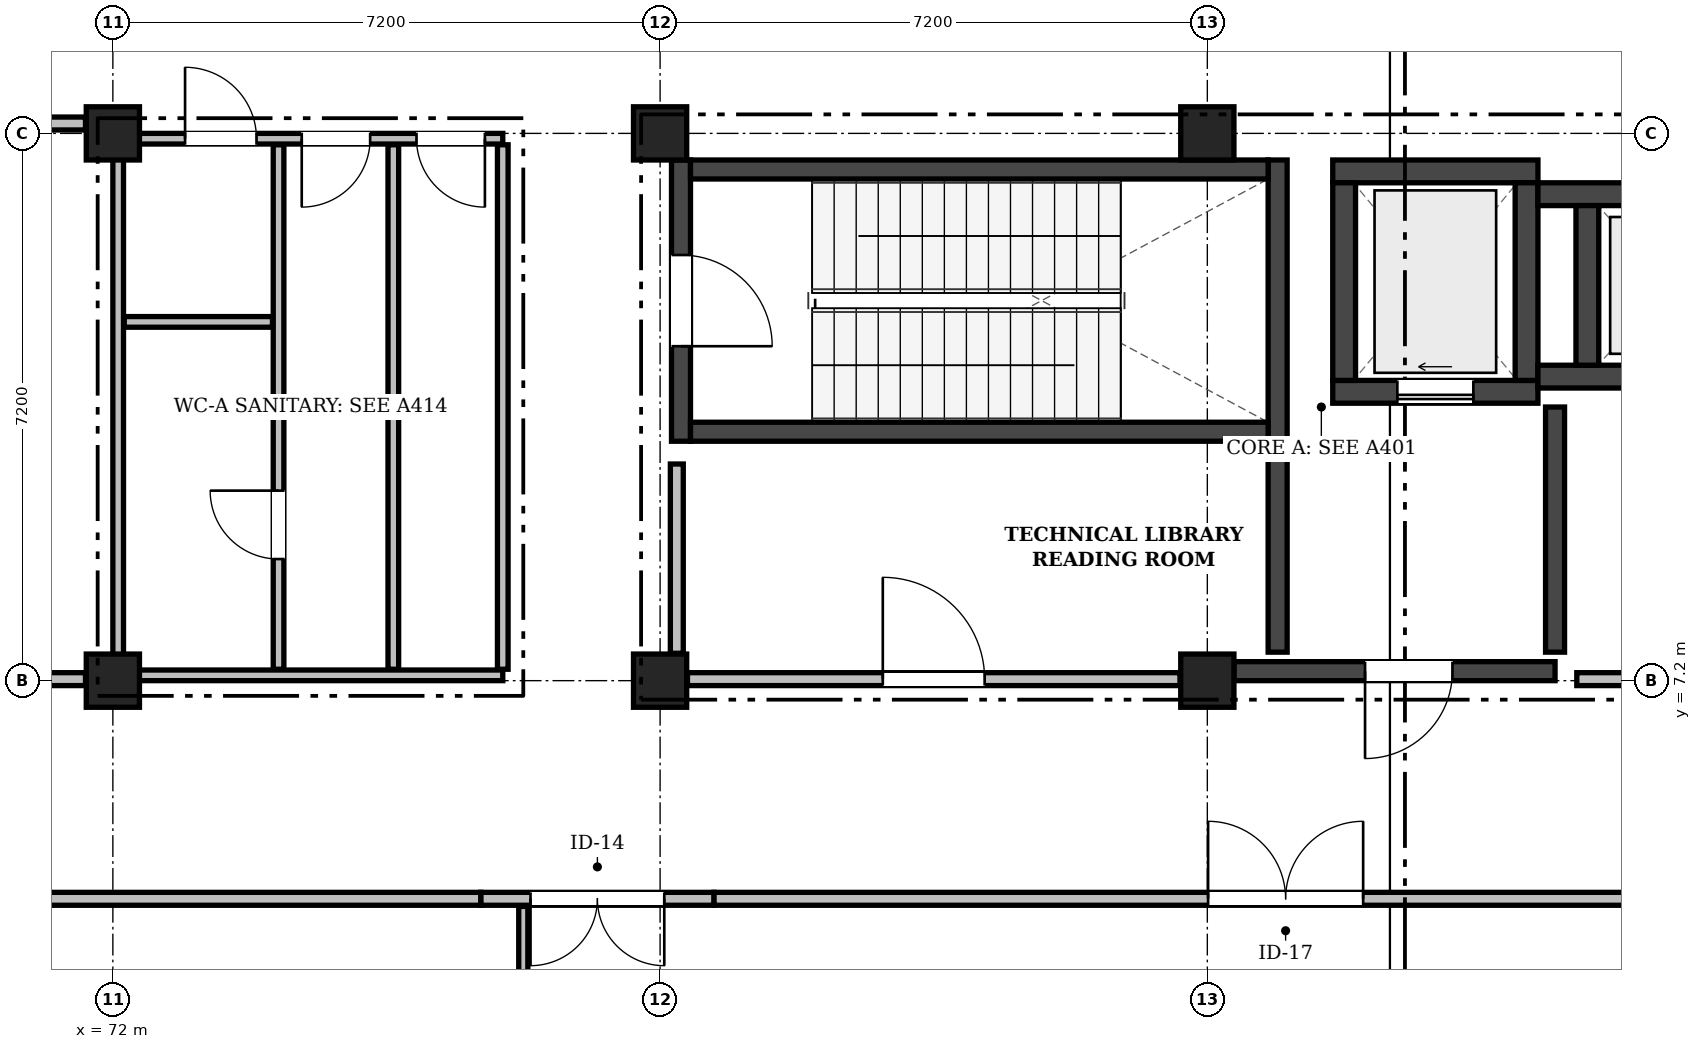
"""IFC4 building model, lengths in metres.
Left out: names, types, materials, properties, quantities, classifications, styles, units other than length and angle.
Written with IfcOpenShell. Run it as: python <this file> out.ifc"""

import sys

from ifc_helpers import new_model, si_unit, direction, frame, frame_2d, origin, origin_2d, place, context, subcontext, project, spatial, rectangle, extrude, element, fill, save


model = new_model("IFC4")
c1 = context("Model", 3, precision=1e-05, world=origin(), true_north=direction((0.0, 1.0)))
c2 = subcontext(c1, "Body", "Model", "MODEL_VIEW")
j1 = project(units=[si_unit("LENGTHUNIT", "METRE"), si_unit("PLANEANGLEUNIT", "RADIAN")], contexts=[c1])
p1 = place(None, origin())
s1 = spatial("IfcSite", under=j1, at=p1, CompositionType="ELEMENT")
p2 = place(p1, origin())
s2 = spatial("IfcBuilding", under=s1, at=p2, CompositionType="ELEMENT")
p3 = place(p2, frame((0.0, 0.0, 18.9)))
s3 = spatial("IfcBuildingStorey", under=s2, at=p3, CompositionType="ELEMENT", Elevation=18.9)
for number, where, z_axis, x_axis in (
    (1, (72.0, 7.2, 0.0), (0.0, 0.0, 1.0), (1.0, 0.0, 0.0)),
    (2, (72.0, 14.4, 0.0), (0.0, 0.0, 1.0), (1.0, 0.0, 0.0)),
    (3, (79.2, 7.2, 0.0), (0.0, 0.0, 1.0), (1.0, 0.0, 0.0)),
    (4, (79.2, 14.4, 0.0), (0.0, 0.0, 1.0), (1.0, 0.0, 0.0)),
    (5, (86.4, 7.2, 0.0), (0.0, 0.0, 1.0), (1.0, 0.0, 0.0)),
    (6, (86.4, 14.4, 0.0), (0.0, 0.0, 1.0), (1.0, 0.0, 0.0)),
):
    element("IfcColumn", number, at=place(p3, frame(where, z_axis=z_axis, x_axis=x_axis)), inside=s3, PredefinedType="COLUMN", context=c2, shape_type="SweptSolid", body=[
        extrude(rectangle(XDim=0.7, YDim=0.7, at=origin_2d()), origin(), (0.0, 0.0, 1.0), 4.5),
    ])
p4 = place(p3, frame((88.05, 11.0, 0.0), z_axis=(0.0, 0.0, 1.0), x_axis=(1.0, 0.0, 0.0)))
e7 = element("IfcWall", 7, at=p4, inside=s3, PredefinedType="SHEAR", context=c2, shape_type="SweptSolid", body=[
    extrude(rectangle(XDim=2.7, YDim=0.3, at=frame_2d((1.35, 0.0))), origin(), (0.0, 0.0, 1.0), 4.25),
])
p5 = place(p4, frame((0.85, 0.0, 0.0)))
e8 = element("IfcOpeningElement", 8, at=p5, cuts=e7, PredefinedType="OPENING", context=c2, shape_type="SweptSolid", body=[
    extrude(rectangle(XDim=1.0, YDim=2.1, at=frame_2d((0.5, 1.05))), frame((0.0, 0.162, 0.0), z_axis=(0.0, -1.0, 0.0), x_axis=(1.0, 0.0, 0.0)), (0.0, 0.0, 1.0), 0.324),
])
p6 = place(p3, frame((88.05, 13.9, 0.0), z_axis=(0.0, 0.0, 1.0), x_axis=(1.0, 0.0, 0.0)))
e9 = element("IfcWall", 9, at=p6, inside=s3, PredefinedType="SHEAR", context=c2, shape_type="SweptSolid", body=[
    extrude(rectangle(XDim=2.7, YDim=0.3, at=frame_2d((1.35, 0.0))), origin(), (0.0, 0.0, 1.0), 4.25),
])
for number, where, z_axis, x_axis in (
    (10, (88.2, 11.15, 0.0), (0.0, 0.0, 1.0), (0.0, 1.0, 0.0)),
    (11, (90.6, 11.15, 0.0), (0.0, 0.0, 1.0), (0.0, 1.0, 0.0)),
):
    element("IfcWall", number, at=place(p3, frame(where, z_axis=z_axis, x_axis=x_axis)), inside=s3, PredefinedType="SHEAR", context=c2, shape_type="SweptSolid", body=[
        extrude(rectangle(XDim=2.6, YDim=0.3, at=frame_2d((1.3, 0.0))), origin(), (0.0, 0.0, 1.0), 4.25),
    ])
p7 = place(p3, frame((90.75, 11.2, 0.0), z_axis=(0.0, 0.0, 1.0), x_axis=(1.0, 0.0, 0.0)))
e12 = element("IfcWall", 12, at=p7, inside=s3, PredefinedType="SHEAR", context=c2, shape_type="SweptSolid", body=[
    extrude(rectangle(XDim=3.0, YDim=0.3, at=frame_2d((1.5, 0.0))), origin(), (0.0, 0.0, 1.0), 4.25),
])
p8 = place(p7, frame((1.25, 0.0, 0.0)))
e13 = element("IfcOpeningElement", 13, at=p8, cuts=e12, PredefinedType="OPENING", context=c2, shape_type="SweptSolid", body=[
    extrude(rectangle(XDim=1.0, YDim=2.1, at=frame_2d((0.5, 1.05))), frame((0.0, 0.162, 0.0), z_axis=(0.0, -1.0, 0.0), x_axis=(1.0, 0.0, 0.0)), (0.0, 0.0, 1.0), 0.324),
])
p9 = place(p3, frame((90.75, 13.6, 0.0), z_axis=(0.0, 0.0, 1.0), x_axis=(1.0, 0.0, 0.0)))
e14 = element("IfcWall", 14, at=p9, inside=s3, PredefinedType="SHEAR", context=c2, shape_type="SweptSolid", body=[
    extrude(rectangle(XDim=3.0, YDim=0.3, at=frame_2d((1.5, 0.0))), origin(), (0.0, 0.0, 1.0), 4.25),
])
p10 = place(p3, frame((91.4, 11.35, 0.0), z_axis=(0.0, 0.0, 1.0), x_axis=(0.0, 1.0, 0.0)))
e15 = element("IfcWall", 15, at=p10, inside=s3, PredefinedType="SHEAR", context=c2, shape_type="SweptSolid", body=[
    extrude(rectangle(XDim=2.1, YDim=0.3, at=frame_2d((1.05, 0.0))), origin(), (0.0, 0.0, 1.0), 4.25),
])
p11 = place(p3, frame((79.475, 10.35, 0.0), z_axis=(0.0, 0.0, 1.0), x_axis=(0.0, 1.0, 0.0)))
e16 = element("IfcWall", 16, at=p11, inside=s3, PredefinedType="SHEAR", context=c2, shape_type="SweptSolid", body=[
    extrude(rectangle(XDim=3.7, YDim=0.25, at=frame_2d((1.85, 0.0))), origin(), (0.0, 0.0, 1.0), 4.25),
])
p12 = place(p11, frame((1.25, 0.0, 0.0)))
e17 = element("IfcOpeningElement", 17, at=p12, cuts=e16, PredefinedType="OPENING", context=c2, shape_type="SweptSolid", body=[
    extrude(rectangle(XDim=1.2, YDim=2.15, at=frame_2d((0.6, 1.075))), frame((0.0, 0.137, 0.0), z_axis=(0.0, -1.0, 0.0), x_axis=(1.0, 0.0, 0.0)), (0.0, 0.0, 1.0), 0.274),
])
p13 = place(p3, frame((87.325, 10.35, 0.0), z_axis=(0.0, 0.0, 1.0), x_axis=(0.0, 1.0, 0.0)))
e18 = element("IfcWall", 18, at=p13, inside=s3, PredefinedType="SHEAR", context=c2, shape_type="SweptSolid", body=[
    extrude(rectangle(XDim=3.7, YDim=0.25, at=frame_2d((1.85, 0.0))), origin(), (0.0, 0.0, 1.0), 4.25),
])
for number, where, z_axis, x_axis in (
    (19, (79.6, 10.475, 0.0), (0.0, 0.0, 1.0), (1.0, 0.0, 0.0)),
    (20, (79.6, 13.925, 0.0), (0.0, 0.0, 1.0), (1.0, 0.0, 0.0)),
):
    element("IfcWall", number, at=place(p3, frame(where, z_axis=z_axis, x_axis=x_axis)), inside=s3, PredefinedType="SHEAR", context=c2, shape_type="SweptSolid", body=[
        extrude(rectangle(XDim=7.6, YDim=0.25, at=frame_2d((3.8, 0.0))), origin(), (0.0, 0.0, 1.0), 4.25),
    ])
p14 = place(p3, frame((86.75, 7.325, 0.0), z_axis=(0.0, 0.0, 1.0), x_axis=(1.0, 0.0, 0.0)))
e21 = element("IfcWall", 21, at=p14, inside=s3, PredefinedType="SHEAR", context=c2, shape_type="SweptSolid", body=[
    extrude(rectangle(XDim=4.225, YDim=0.25, at=frame_2d((2.113, 0.0))), origin(), (0.0, 0.0, 1.0), 4.25),
])
p15 = place(p14, frame((1.725, 0.0, 0.0)))
e22 = element("IfcOpeningElement", 22, at=p15, cuts=e21, PredefinedType="OPENING", context=c2, shape_type="SweptSolid", body=[
    extrude(rectangle(XDim=1.15, YDim=2.15, at=frame_2d((0.575, 1.075))), frame((0.0, 0.137, 0.0), z_axis=(0.0, -1.0, 0.0), x_axis=(1.0, 0.0, 0.0)), (0.0, 0.0, 1.0), 0.274),
])
p16 = place(p3, frame((87.325, 7.575, 0.0), z_axis=(0.0, 0.0, 1.0), x_axis=(0.0, 1.0, 0.0)))
e23 = element("IfcWall", 23, at=p16, inside=s3, PredefinedType="SHEAR", context=c2, shape_type="SweptSolid", body=[
    extrude(rectangle(XDim=2.77, YDim=0.25, at=frame_2d((1.385, 0.0))), origin(), (0.0, 0.0, 1.0), 4.25),
])
p17 = place(p3, frame((90.975, 7.575, 0.0), z_axis=(0.0, 0.0, 1.0), x_axis=(0.0, 1.0, 0.0)))
e24 = element("IfcWall", 24, at=p17, inside=s3, PredefinedType="SHEAR", context=c2, shape_type="SweptSolid", body=[
    extrude(rectangle(XDim=3.225, YDim=0.25, at=frame_2d((1.613, 0.0))), origin(), (0.0, 0.0, 1.0), 4.25),
])
p18 = place(p3, frame((72.07, 7.27, 0.0), z_axis=(0.0, 0.0, 1.0), x_axis=(1.0, 0.0, 0.0)))
e25 = element("IfcWall", 25, at=p18, inside=s3, PredefinedType="PARTITIONING", context=c2, shape_type="SweptSolid", body=[
    extrude(rectangle(XDim=5.06, YDim=0.14, at=frame_2d((2.53, 0.0))), origin(), (0.0, 0.0, 1.0), 3.73),
])
p19 = place(p3, frame((72.07, 14.33, 0.0), z_axis=(0.0, 0.0, 1.0), x_axis=(1.0, 0.0, 0.0)))
e26 = element("IfcWall", 26, at=p19, inside=s3, PredefinedType="PARTITIONING", context=c2, shape_type="SweptSolid", body=[
    extrude(rectangle(XDim=5.06, YDim=0.14, at=frame_2d((2.53, 0.0))), origin(), (0.0, 0.0, 1.0), 3.73),
])
p20 = place(p19, frame((0.88, 0.0, 0.0)))
e27 = element("IfcOpeningElement", 27, at=p20, cuts=e26, PredefinedType="OPENING", context=c2, shape_type="SweptSolid", body=[
    extrude(rectangle(XDim=0.94, YDim=2.1, at=frame_2d((0.47, 1.05))), frame((0.0, 0.082, 0.0), z_axis=(0.0, -1.0, 0.0), x_axis=(1.0, 0.0, 0.0)), (0.0, 0.0, 1.0), 0.164),
])
p21 = place(p19, frame((2.415, 0.0, 0.0)))
e28 = element("IfcOpeningElement", 28, at=p21, cuts=e26, PredefinedType="OPENING", context=c2, shape_type="SweptSolid", body=[
    extrude(rectangle(XDim=0.9, YDim=2.08, at=frame_2d((0.45, 1.04))), frame((0.0, 0.082, 0.0), z_axis=(0.0, -1.0, 0.0), x_axis=(1.0, 0.0, 0.0)), (0.0, 0.0, 1.0), 0.164),
])
p22 = place(p19, frame((3.925, 0.0, 0.0)))
e29 = element("IfcOpeningElement", 29, at=p22, cuts=e26, PredefinedType="OPENING", context=c2, shape_type="SweptSolid", body=[
    extrude(rectangle(XDim=0.9, YDim=2.08, at=frame_2d((0.45, 1.04))), frame((0.0, 0.082, 0.0), z_axis=(0.0, -1.0, 0.0), x_axis=(1.0, 0.0, 0.0)), (0.0, 0.0, 1.0), 0.164),
])
p23 = place(p3, frame((72.07, 7.35, 0.0), z_axis=(0.0, 0.0, 1.0), x_axis=(0.0, 1.0, 0.0)))
e30 = element("IfcWall", 30, at=p23, inside=s3, PredefinedType="PARTITIONING", context=c2, shape_type="SweptSolid", body=[
    extrude(rectangle(XDim=6.9, YDim=0.14, at=frame_2d((3.45, 0.0))), origin(), (0.0, 0.0, 1.0), 3.73),
])
p24 = place(p3, frame((77.13, 7.35, 0.0), z_axis=(0.0, 0.0, 1.0), x_axis=(0.0, 1.0, 0.0)))
e31 = element("IfcWall", 31, at=p24, inside=s3, PredefinedType="PARTITIONING", context=c2, shape_type="SweptSolid", body=[
    extrude(rectangle(XDim=6.9, YDim=0.14, at=frame_2d((3.45, 0.0))), origin(), (0.0, 0.0, 1.0), 4.16),
])
p25 = place(p3, frame((74.18, 7.35, 0.0), z_axis=(0.0, 0.0, 1.0), x_axis=(0.0, 1.0, 0.0)))
e32 = element("IfcWall", 32, at=p25, inside=s3, PredefinedType="PARTITIONING", context=c2, shape_type="SweptSolid", body=[
    extrude(rectangle(XDim=6.9, YDim=0.14, at=frame_2d((3.45, 0.0))), origin(), (0.0, 0.0, 1.0), 4.16),
])
p26 = place(p25, frame((1.45, 0.0, 0.0)))
e33 = element("IfcOpeningElement", 33, at=p26, cuts=e32, PredefinedType="OPENING", context=c2, shape_type="SweptSolid", body=[
    extrude(rectangle(XDim=0.9, YDim=2.08, at=frame_2d((0.45, 1.04))), frame((0.0, 0.082, 0.0), z_axis=(0.0, -1.0, 0.0), x_axis=(1.0, 0.0, 0.0)), (0.0, 0.0, 1.0), 0.164),
])
p27 = place(p3, frame((75.69, 7.35, 0.0), z_axis=(0.0, 0.0, 1.0), x_axis=(0.0, 1.0, 0.0)))
e34 = element("IfcWall", 34, at=p27, inside=s3, PredefinedType="PARTITIONING", context=c2, shape_type="SweptSolid", body=[
    extrude(rectangle(XDim=6.9, YDim=0.14, at=frame_2d((3.45, 0.0))), origin(), (0.0, 0.0, 1.0), 4.16),
])
p28 = place(p3, frame((72.15, 11.92, 0.0), z_axis=(0.0, 0.0, 1.0), x_axis=(1.0, 0.0, 0.0)))
e35 = element("IfcWall", 35, at=p28, inside=s3, PredefinedType="PARTITIONING", context=c2, shape_type="SweptSolid", body=[
    extrude(rectangle(XDim=1.95, YDim=0.14, at=frame_2d((0.975, 0.0))), origin(), (0.0, 0.0, 1.0), 4.16),
])
p29 = place(p3, frame((60.981, 14.53, 0.0), z_axis=(0.0, 0.0, 1.0), x_axis=(1.0, 0.0, 0.0)))
e36 = element("IfcWall", 36, at=p29, inside=s3, PredefinedType="PARTITIONING", context=c2, shape_type="SweptSolid", body=[
    extrude(rectangle(XDim=10.658, YDim=0.17, at=frame_2d((5.329, 0.0))), origin(), (0.0, 0.0, 1.0), 3.33),
])
p30 = place(p29, frame((4.809, 0.0, 0.0)))
e37 = element("IfcOpeningElement", 37, at=p30, cuts=e36, PredefinedType="OPENING", context=c2, shape_type="SweptSolid", body=[
    extrude(rectangle(XDim=1.04, YDim=2.18, at=frame_2d((0.52, 1.09))), frame((0.0, 0.097, 0.0), z_axis=(0.0, -1.0, 0.0), x_axis=(1.0, 0.0, 0.0)), (0.0, 0.0, 1.0), 0.194),
])
p31 = place(p3, frame((79.42, 7.56, 0.0), z_axis=(0.0, 0.0, 1.0), x_axis=(0.0, 1.0, 0.0)))
e38 = element("IfcWall", 38, at=p31, inside=s3, PredefinedType="PARTITIONING", context=c2, shape_type="SweptSolid", body=[
    extrude(rectangle(XDim=2.49, YDim=0.17, at=frame_2d((1.245, 0.0))), origin(), (0.0, 0.0, 1.0), 3.73),
])
p32 = place(p3, frame((76.84, 4.33, 0.0), z_axis=(0.0, 0.0, 1.0), x_axis=(1.0, 0.0, 0.0)))
e39 = element("IfcWall", 39, at=p32, inside=s3, PredefinedType="PARTITIONING", context=c2, shape_type="SweptSolid", body=[
    extrude(rectangle(XDim=3.07, YDim=0.17, at=frame_2d((1.535, 0.0))), origin(), (0.0, 0.0, 1.0), 4.16),
])
p33 = place(p32, frame((0.655, 0.0, 0.0)))
e40 = element("IfcOpeningElement", 40, at=p33, cuts=e39, PredefinedType="OPENING", context=c2, shape_type="SweptSolid", body=[
    extrude(rectangle(XDim=1.76, YDim=2.3, at=frame_2d((0.88, 1.15))), frame((0.0, 0.097, 0.0), z_axis=(0.0, -1.0, 0.0), x_axis=(1.0, 0.0, 0.0)), (0.0, 0.0, 1.0), 0.194),
])
p34 = place(p3, frame((79.56, 7.22, 0.0), z_axis=(0.0, 0.0, 1.0), x_axis=(1.0, 0.0, 0.0)))
e41 = element("IfcWall", 41, at=p34, inside=s3, PredefinedType="PARTITIONING", context=c2, shape_type="SweptSolid", body=[
    extrude(rectangle(XDim=6.48, YDim=0.17, at=frame_2d((3.24, 0.0))), origin(), (0.0, 0.0, 1.0), 3.73),
])
p35 = place(p34, frame((2.57, 0.0, 0.0)))
e42 = element("IfcOpeningElement", 42, at=p35, cuts=e41, PredefinedType="OPENING", context=c2, shape_type="SweptSolid", body=[
    extrude(rectangle(XDim=1.34, YDim=2.24, at=frame_2d((0.67, 1.12))), frame((0.0, 0.097, 0.0), z_axis=(0.0, -1.0, 0.0), x_axis=(1.0, 0.0, 0.0)), (0.0, 0.0, 1.0), 0.194),
])
p36 = place(p3, frame((91.261, 7.22, 0.0), z_axis=(0.0, 0.0, 1.0), x_axis=(1.0, 0.0, 0.0)))
e43 = element("IfcWall", 43, at=p36, inside=s3, PredefinedType="PARTITIONING", context=c2, shape_type="SweptSolid", body=[
    extrude(rectangle(XDim=1.979, YDim=0.17, at=frame_2d((0.99, 0.0))), origin(), (0.0, 0.0, 1.0), 3.73),
])
p37 = place(p3, frame((79.91, 4.33, 0.0), z_axis=(0.0, 0.0, 1.0), x_axis=(1.0, 0.0, 0.0)))
e44 = element("IfcWall", 44, at=p37, inside=s3, PredefinedType="PARTITIONING", context=c2, shape_type="SweptSolid", body=[
    extrude(rectangle(XDim=15.04, YDim=0.17, at=frame_2d((7.52, 0.0))), origin(), (0.0, 0.0, 1.0), 4.16),
])
p38 = place(p37, frame((6.5, 0.0, 0.0)))
e45 = element("IfcOpeningElement", 45, at=p38, cuts=e44, PredefinedType="OPENING", context=c2, shape_type="SweptSolid", body=[
    extrude(rectangle(XDim=2.04, YDim=2.34, at=frame_2d((1.02, 1.17))), frame((0.0, 0.097, 0.0), z_axis=(0.0, -1.0, 0.0), x_axis=(1.0, 0.0, 0.0)), (0.0, 0.0, 1.0), 0.194),
])
p39 = place(p3, frame((65.16, 7.22, 0.0), z_axis=(0.0, 0.0, 1.0), x_axis=(1.0, 0.0, 0.0)))
e46 = element("IfcWall", 46, at=p39, inside=s3, PredefinedType="PARTITIONING", context=c2, shape_type="SweptSolid", body=[
    extrude(rectangle(XDim=6.48, YDim=0.17, at=frame_2d((3.24, 0.0))), origin(), (0.0, 0.0, 1.0), 3.73),
])
p40 = place(p39, frame((2.67, 0.0, 0.0)))
e47 = element("IfcOpeningElement", 47, at=p40, cuts=e46, PredefinedType="OPENING", context=c2, shape_type="SweptSolid", body=[
    extrude(rectangle(XDim=1.14, YDim=2.2, at=frame_2d((0.57, 1.1))), frame((0.0, 0.097, 0.0), z_axis=(0.0, -1.0, 0.0), x_axis=(1.0, 0.0, 0.0)), (0.0, 0.0, 1.0), 0.194),
])
p41 = place(p3, frame((60.981, 4.33, 0.0), z_axis=(0.0, 0.0, 1.0), x_axis=(1.0, 0.0, 0.0)))
e48 = element("IfcWall", 48, at=p41, inside=s3, PredefinedType="PARTITIONING", context=c2, shape_type="SweptSolid", body=[
    extrude(rectangle(XDim=15.859, YDim=0.17, at=frame_2d((7.929, 0.0))), origin(), (0.0, 0.0, 1.0), 4.16),
])
p42 = place(p41, frame((6.969, 0.0, 0.0)))
e49 = element("IfcOpeningElement", 49, at=p42, cuts=e48, PredefinedType="OPENING", context=c2, shape_type="SweptSolid", body=[
    extrude(rectangle(XDim=1.92, YDim=2.32, at=frame_2d((0.96, 1.16))), frame((0.0, 0.097, 0.0), z_axis=(0.0, -1.0, 0.0), x_axis=(1.0, 0.0, 0.0)), (0.0, 0.0, 1.0), 0.194),
])
p43 = place(p3, frame((77.4, 0.152, 0.0), z_axis=(0.0, 0.0, 1.0), x_axis=(0.0, 1.0, 0.0)))
e50 = element("IfcWall", 50, at=p43, inside=s3, PredefinedType="PARTITIONING", context=c2, shape_type="SweptSolid", body=[
    extrude(rectangle(XDim=4.078, YDim=0.12, at=frame_2d((2.039, 0.0))), origin(), (0.0, 0.0, 1.0), 4.16),
])
p44 = place(p5, frame((1.0, 0.0, 0.0), z_axis=(0.0, 0.0, 1.0), x_axis=(-1.0, 0.0, 0.0)))
e51 = element("IfcDoor", 51, at=p44, inside=s3, OperationType="SLIDING_TO_LEFT", PredefinedType="DOOR", context=c2, shape_type="SweptSolid", body=[
    extrude(rectangle(XDim=1.0, YDim=2.1, at=frame_2d((0.5, 1.05))), frame((0.0, 0.025, 0.0), z_axis=(0.0, -1.0, 0.0), x_axis=(1.0, 0.0, 0.0)), (0.0, 0.0, 1.0), 0.05),
])
fill(e8, e51)
p45 = place(p12, frame((1.2, 0.0, 0.0), z_axis=(0.0, 0.0, 1.0), x_axis=(-1.0, 0.0, 0.0)))
e52 = element("IfcDoor", 52, at=p45, inside=s3, OperationType="SINGLE_SWING_RIGHT", PredefinedType="DOOR", context=c2, shape_type="SweptSolid", body=[
    extrude(rectangle(XDim=1.2, YDim=2.15, at=frame_2d((0.6, 1.075))), frame((0.0, 0.025, 0.0), z_axis=(0.0, -1.0, 0.0), x_axis=(1.0, 0.0, 0.0)), (0.0, 0.0, 1.0), 0.05),
])
fill(e17, e52)
p46 = place(p15, frame((1.15, 0.0, 0.0), z_axis=(0.0, 0.0, 1.0), x_axis=(-1.0, 0.0, 0.0)))
e53 = element("IfcDoor", 53, at=p46, inside=s3, OperationType="SINGLE_SWING_RIGHT", PredefinedType="DOOR", context=c2, shape_type="SweptSolid", body=[
    extrude(rectangle(XDim=1.15, YDim=2.15, at=frame_2d((0.575, 1.075))), frame((0.0, 0.025, 0.0), z_axis=(0.0, -1.0, 0.0), x_axis=(1.0, 0.0, 0.0)), (0.0, 0.0, 1.0), 0.05),
])
fill(e22, e53)
p47 = place(p20, origin())
e54 = element("IfcDoor", 54, at=p47, inside=s3, OperationType="SINGLE_SWING_LEFT", PredefinedType="DOOR", context=c2, shape_type="SweptSolid", body=[
    extrude(rectangle(XDim=0.94, YDim=2.1, at=frame_2d((0.47, 1.05))), frame((0.0, 0.025, 0.0), z_axis=(0.0, -1.0, 0.0), x_axis=(1.0, 0.0, 0.0)), (0.0, 0.0, 1.0), 0.05),
])
fill(e27, e54)
p48 = place(p21, frame((0.9, 0.0, 0.0), z_axis=(0.0, 0.0, 1.0), x_axis=(-1.0, 0.0, 0.0)))
e55 = element("IfcDoor", 55, at=p48, inside=s3, OperationType="SINGLE_SWING_RIGHT", PredefinedType="DOOR", context=c2, shape_type="SweptSolid", body=[
    extrude(rectangle(XDim=0.9, YDim=2.08, at=frame_2d((0.45, 1.04))), frame((0.0, 0.025, 0.0), z_axis=(0.0, -1.0, 0.0), x_axis=(1.0, 0.0, 0.0)), (0.0, 0.0, 1.0), 0.05),
])
fill(e28, e55)
p49 = place(p22, frame((0.9, 0.0, 0.0), z_axis=(0.0, 0.0, 1.0), x_axis=(-1.0, 0.0, 0.0)))
e56 = element("IfcDoor", 56, at=p49, inside=s3, OperationType="SINGLE_SWING_LEFT", PredefinedType="DOOR", context=c2, shape_type="SweptSolid", body=[
    extrude(rectangle(XDim=0.9, YDim=2.08, at=frame_2d((0.45, 1.04))), frame((0.0, 0.025, 0.0), z_axis=(0.0, -1.0, 0.0), x_axis=(1.0, 0.0, 0.0)), (0.0, 0.0, 1.0), 0.05),
])
fill(e29, e56)
p50 = place(p26, origin())
e57 = element("IfcDoor", 57, at=p50, inside=s3, OperationType="SINGLE_SWING_RIGHT", PredefinedType="DOOR", context=c2, shape_type="SweptSolid", body=[
    extrude(rectangle(XDim=0.9, YDim=2.08, at=frame_2d((0.45, 1.04))), frame((0.0, 0.025, 0.0), z_axis=(0.0, -1.0, 0.0), x_axis=(1.0, 0.0, 0.0)), (0.0, 0.0, 1.0), 0.05),
])
fill(e33, e57)
p51 = place(p38, origin())
e58 = element("IfcDoor", 58, at=p51, inside=s3, OperationType="DOUBLE_DOOR_SINGLE_SWING", PredefinedType="DOOR", context=c2, shape_type="SweptSolid", body=[
    extrude(rectangle(XDim=2.04, YDim=2.34, at=frame_2d((1.02, 1.17))), frame((0.0, 0.025, 0.0), z_axis=(0.0, -1.0, 0.0), x_axis=(1.0, 0.0, 0.0)), (0.0, 0.0, 1.0), 0.05),
])
fill(e45, e58)
p52 = place(p35, origin())
e59 = element("IfcDoor", 59, at=p52, inside=s3, OperationType="SINGLE_SWING_LEFT", PredefinedType="DOOR", context=c2, shape_type="SweptSolid", body=[
    extrude(rectangle(XDim=1.34, YDim=2.24, at=frame_2d((0.67, 1.12))), frame((0.0, 0.025, 0.0), z_axis=(0.0, -1.0, 0.0), x_axis=(1.0, 0.0, 0.0)), (0.0, 0.0, 1.0), 0.05),
])
fill(e42, e59)
p53 = place(p33, frame((1.76, 0.0, 0.0), z_axis=(0.0, 0.0, 1.0), x_axis=(-1.0, 0.0, 0.0)))
e60 = element("IfcDoor", 60, at=p53, inside=s3, OperationType="DOUBLE_DOOR_SINGLE_SWING", PredefinedType="DOOR", context=c2, shape_type="SweptSolid", body=[
    extrude(rectangle(XDim=1.76, YDim=2.3, at=frame_2d((0.88, 1.15))), frame((0.0, 0.025, 0.0), z_axis=(0.0, -1.0, 0.0), x_axis=(1.0, 0.0, 0.0)), (0.0, 0.0, 1.0), 0.05),
])
fill(e40, e60)
save(model, sys.argv[1])
